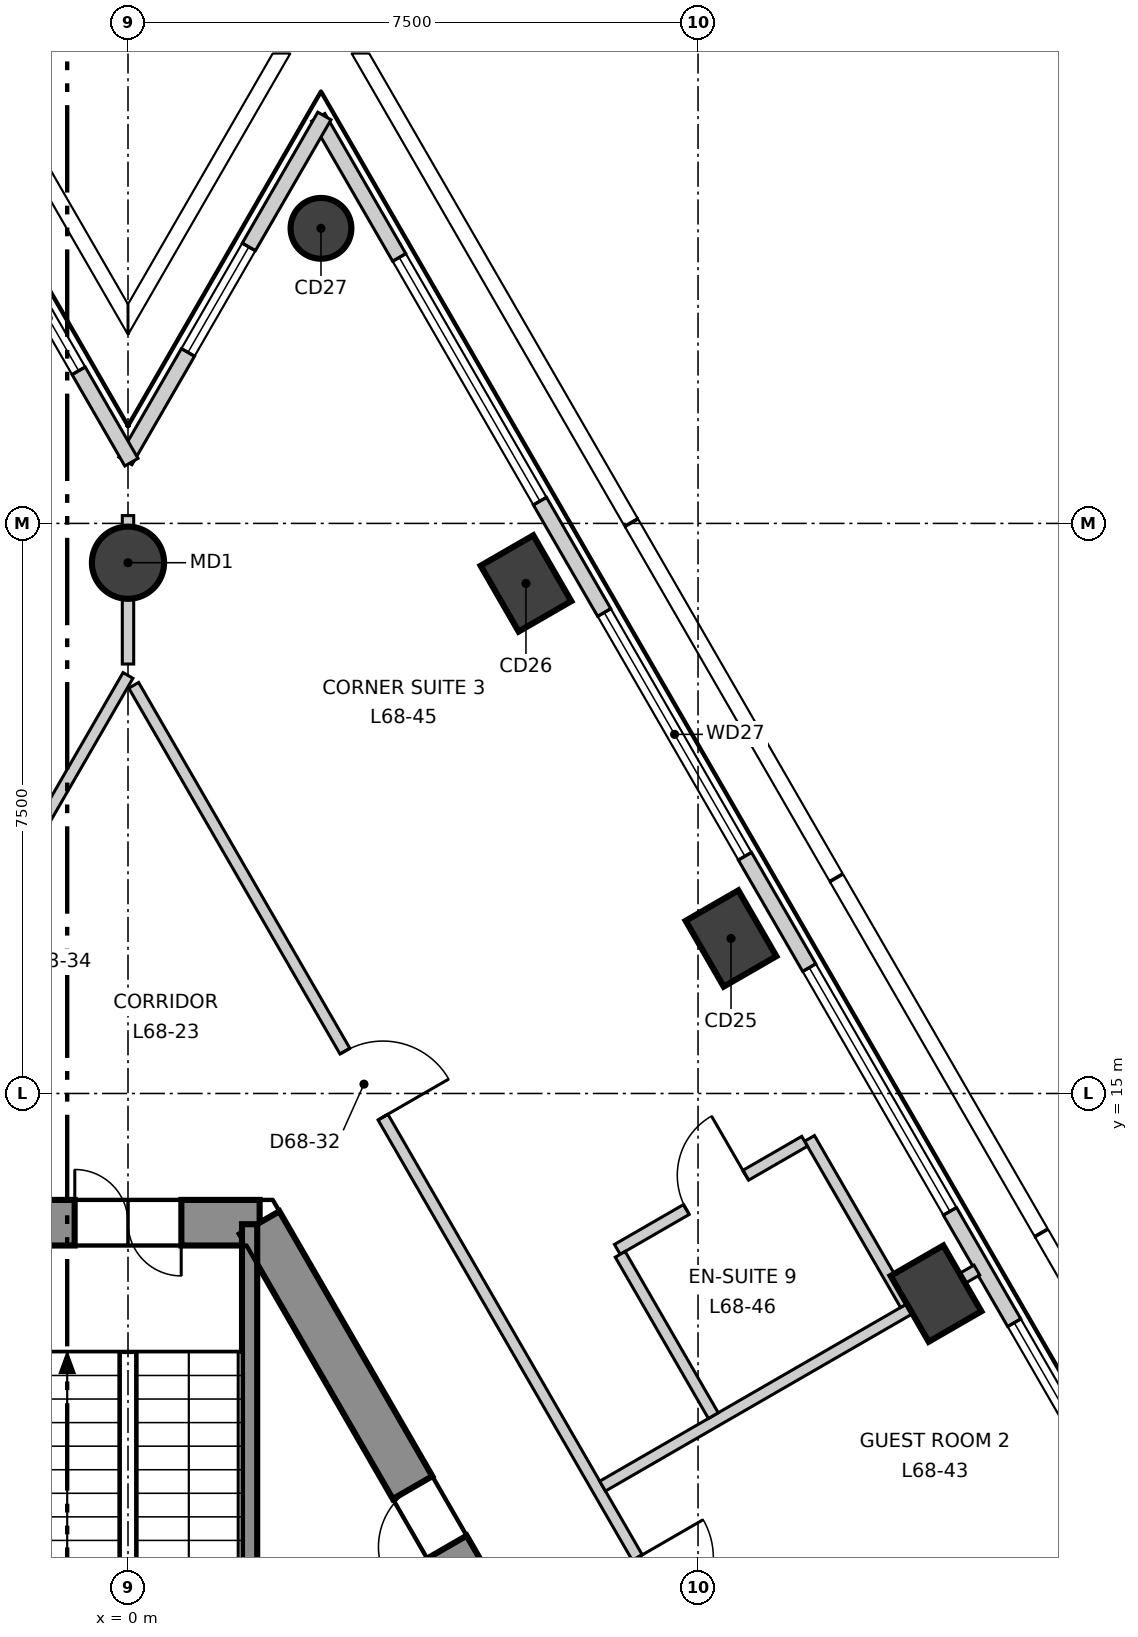
"""IFC4 building model, lengths in metres.
Left out: names, types, materials, properties, quantities, classifications, styles, units other than length and angle.
Written with IfcOpenShell. Run it as: python <this file> out.ifc"""

import sys

from ifc_helpers import new_model, si_unit, direction, frame, frame_2d, origin, origin_2d, place, context, subcontext, project, spatial, polyline, rectangle, circle, outline, extrude, element, fill, save


model = new_model("IFC4")
c1 = context("Model", 3, precision=1e-05, world=origin(), true_north=direction((0.0, 1.0)))
c2 = subcontext(c1, "Body", "Model", "MODEL_VIEW")
j1 = project(units=[si_unit("LENGTHUNIT", "METRE"), si_unit("PLANEANGLEUNIT", "RADIAN")], contexts=[c1])
p1 = place(None, origin())
s1 = spatial("IfcSite", under=j1, at=p1, CompositionType="ELEMENT")
p2 = place(p1, origin())
s2 = spatial("IfcBuilding", under=s1, at=p2, CompositionType="ELEMENT")
p3 = place(p2, frame((0.0, 0.0, 289.9)))
s3 = spatial("IfcBuildingStorey", under=s2, at=p3, CompositionType="ELEMENT", Elevation=289.9)
p4 = place(p3, frame((1.732, 13.3, -0.3), z_axis=(0.0, 0.0, 1.0), x_axis=(-1.0, 0.0, 0.0)))
e1 = element("IfcWall", 1, at=p4, inside=s3, PredefinedType="SHEAR", context=c2, shape_type="SweptSolid", body=[
    extrude(outline(polyline([(-0.173, -0.3), (1.732, -0.3), (3.637, -0.3), (3.291, 0.3), (1.732, 0.3), (0.173, 0.3), (-0.173, -0.3)])), origin(), (0.0, 0.0, 1.0), 3.6),
])
p5 = place(p4, frame((1.032, 0.0, 0.3)))
e2 = element("IfcOpeningElement", 2, at=p5, cuts=e1, PredefinedType="OPENING", context=c2, shape_type="SweptSolid", body=[
    extrude(rectangle(XDim=1.4, YDim=2.1, at=frame_2d((0.7, 1.05))), frame((0.0, 0.31, 0.0), z_axis=(0.0, -1.0, 0.0), x_axis=(1.0, 0.0, 0.0)), (0.0, 0.0, 1.0), 0.62),
])
p6 = place(p3, frame((12.384, -5.15, -0.3), z_axis=(0.0, 0.0, 1.0), x_axis=(-0.500000539815, 0.866025092122, 0.0)))
e3 = element("IfcWall", 3, at=p6, inside=s3, PredefinedType="SHEAR", context=c2, shape_type="SweptSolid", body=[
    extrude(outline(polyline([(-0.173, -0.301), (1.795, -0.301), (3.763, -0.301), (5.731, -0.301), (7.7, -0.301), (9.668, -0.301), (11.636, -0.301), (13.604, -0.3), (15.573, -0.3), (17.541, -0.3), (19.509, -0.3), (21.477, -0.3), (21.131, 0.3), (19.226, 0.3), (17.321, 0.3), (15.415, 0.3), (13.51, 0.3), (11.605, 0.3), (9.699, 0.3), (7.794, 0.3), (5.889, 0.3), (3.984, 0.3), (2.078, 0.3), (0.173, 0.3), (-0.173, -0.301)])), origin(), (0.0, 0.0, 1.0), 3.6),
])
p7 = place(p6, frame((16.378, 0.0, 0.3)))
e4 = element("IfcOpeningElement", 4, at=p7, cuts=e3, PredefinedType="OPENING", context=c2, shape_type="SweptSolid", body=[
    extrude(rectangle(XDim=0.9, YDim=2.1, at=frame_2d((0.45, 1.05))), frame((0.0, 0.31, 0.0), z_axis=(0.0, -1.0, 0.0), x_axis=(1.0, 0.0, 0.0)), (0.0, 0.0, 1.0), 0.621),
])
p8 = place(p6, frame((4.026, 0.0, 0.3)))
e5 = element("IfcOpeningElement", 5, at=p8, cuts=e3, PredefinedType="OPENING", context=c2, shape_type="SweptSolid", body=[
    extrude(rectangle(XDim=0.9, YDim=2.1, at=frame_2d((0.45, 1.05))), frame((0.0, 0.31, 0.0), z_axis=(0.0, -1.0, 0.0), x_axis=(1.0, 0.0, 0.0)), (0.0, 0.0, 1.0), 0.621),
])
for number, where, z_axis, x_axis in (
    (6, (10.631, 12.367, -0.3), (0.0, 0.0, 1.0), (-0.5, 0.866, 0.0)),
    (7, (7.934, 17.039, -0.3), (0.0, 0.0, 1.0), (-0.5, 0.866, 0.0)),
    (8, (5.236, 21.71, -0.3), (0.0, 0.0, 1.0), (-0.5, 0.866, 0.0)),
):
    element("IfcColumn", number, at=place(p3, frame(where, z_axis=z_axis, x_axis=x_axis)), inside=s3, PredefinedType="COLUMN", context=c2, shape_type="SweptSolid", body=[
        extrude(rectangle(XDim=1.0, YDim=0.8, at=origin_2d()), origin(), (0.0, 0.0, 1.0), 3.6),
    ])
p9 = place(p3, frame((2.539, 26.382, -0.3), z_axis=(0.0, 0.0, 1.0), x_axis=(-0.5, 0.866025403784, 0.0)))
e9 = element("IfcColumn", 9, at=p9, inside=s3, PredefinedType="COLUMN", context=c2, shape_type="SweptSolid", body=[
    extrude(circle(Radius=0.4, at=origin_2d()), origin(), (0.0, 0.0, 1.0), 3.6),
])
p10 = place(p3, frame((0.0, 21.983, -0.3), z_axis=(0.0, 0.0, 1.0), x_axis=(1.0, 0.0, 0.0)))
e10 = element("IfcColumn", 10, at=p10, inside=s3, PredefinedType="COLUMN", context=c2, shape_type="SweptSolid", body=[
    extrude(circle(Radius=0.475, at=origin_2d()), origin(), (0.0, 0.0, 1.0), 3.6),
])
p11 = place(p3, frame((25.375, -11.77, 0.0), z_axis=(0.0, 0.0, 1.0), x_axis=(-0.500008134474, 0.866020707292, 0.0)))
e11 = element("IfcWall", 11, at=p11, inside=s3, PredefinedType="ELEMENTEDWALL", context=c2, shape_type="SweptSolid", body=[
    extrude(rectangle(XDim=45.741, YDim=0.2, at=frame_2d((22.871, 0.0))), origin(), (0.0, 0.0, 1.0), 3.3),
])
p12 = place(p11, frame((2.15, 0.0, 0.9)))
e12 = element("IfcOpeningElement", 12, at=p12, cuts=e11, PredefinedType="OPENING", context=c2, shape_type="SweptSolid", body=[
    extrude(rectangle(XDim=3.7, YDim=2.2, at=frame_2d((1.85, 1.1))), frame((0.0, 0.11, 0.0), z_axis=(0.0, -1.0, 0.0), x_axis=(1.0, 0.0, 0.0)), (0.0, 0.0, 1.0), 0.22),
])
p13 = place(p11, frame((7.544, 0.0, 0.9)))
e13 = element("IfcOpeningElement", 13, at=p13, cuts=e11, PredefinedType="OPENING", context=c2, shape_type="SweptSolid", body=[
    extrude(rectangle(XDim=3.7, YDim=2.2, at=frame_2d((1.85, 1.1))), frame((0.0, 0.11, 0.0), z_axis=(0.0, -1.0, 0.0), x_axis=(1.0, 0.0, 0.0)), (0.0, 0.0, 1.0), 0.22),
])
p14 = place(p11, frame((12.939, 0.0, 0.9)))
e14 = element("IfcOpeningElement", 14, at=p14, cuts=e11, PredefinedType="OPENING", context=c2, shape_type="SweptSolid", body=[
    extrude(rectangle(XDim=3.7, YDim=2.2, at=frame_2d((1.85, 1.1))), frame((0.0, 0.11, 0.0), z_axis=(0.0, -1.0, 0.0), x_axis=(1.0, 0.0, 0.0)), (0.0, 0.0, 1.0), 0.22),
])
p15 = place(p11, frame((18.333, 0.0, 0.9)))
e15 = element("IfcOpeningElement", 15, at=p15, cuts=e11, PredefinedType="OPENING", context=c2, shape_type="SweptSolid", body=[
    extrude(rectangle(XDim=3.7, YDim=2.2, at=frame_2d((1.85, 1.1))), frame((0.0, 0.11, 0.0), z_axis=(0.0, -1.0, 0.0), x_axis=(1.0, 0.0, 0.0)), (0.0, 0.0, 1.0), 0.22),
])
p16 = place(p11, frame((23.728, 0.0, 0.9)))
e16 = element("IfcOpeningElement", 16, at=p16, cuts=e11, PredefinedType="OPENING", context=c2, shape_type="SweptSolid", body=[
    extrude(rectangle(XDim=3.7, YDim=2.2, at=frame_2d((1.85, 1.1))), frame((0.0, 0.11, 0.0), z_axis=(0.0, -1.0, 0.0), x_axis=(1.0, 0.0, 0.0)), (0.0, 0.0, 1.0), 0.22),
])
p17 = place(p11, frame((29.122, 0.0, 0.9)))
e17 = element("IfcOpeningElement", 17, at=p17, cuts=e11, PredefinedType="OPENING", context=c2, shape_type="SweptSolid", body=[
    extrude(rectangle(XDim=3.7, YDim=2.2, at=frame_2d((1.85, 1.1))), frame((0.0, 0.11, 0.0), z_axis=(0.0, -1.0, 0.0), x_axis=(1.0, 0.0, 0.0)), (0.0, 0.0, 1.0), 0.22),
])
p18 = place(p11, frame((34.517, 0.0, 0.9)))
e18 = element("IfcOpeningElement", 18, at=p18, cuts=e11, PredefinedType="OPENING", context=c2, shape_type="SweptSolid", body=[
    extrude(rectangle(XDim=3.7, YDim=2.2, at=frame_2d((1.85, 1.1))), frame((0.0, 0.11, 0.0), z_axis=(0.0, -1.0, 0.0), x_axis=(1.0, 0.0, 0.0)), (0.0, 0.0, 1.0), 0.22),
])
p19 = place(p11, frame((39.911, 0.0, 0.9)))
e19 = element("IfcOpeningElement", 19, at=p19, cuts=e11, PredefinedType="OPENING", context=c2, shape_type="SweptSolid", body=[
    extrude(rectangle(XDim=3.7, YDim=2.2, at=frame_2d((1.85, 1.1))), frame((0.0, 0.11, 0.0), z_axis=(0.0, -1.0, 0.0), x_axis=(1.0, 0.0, 0.0)), (0.0, 0.0, 1.0), 0.22),
])
p20 = place(p3, frame((2.584, 27.86, 0.0), z_axis=(0.0, 0.0, 1.0), x_axis=(-0.499832707108, -0.866121968839, 0.0)))
e20 = element("IfcWall", 20, at=p20, inside=s3, PredefinedType="ELEMENTEDWALL", context=c2, shape_type="SweptSolid", body=[
    extrude(rectangle(XDim=5.24, YDim=0.2, at=frame_2d((2.62, 0.0))), origin(), (0.0, 0.0, 1.0), 3.3),
])
p21 = place(p20, frame((1.99, 0.0, 0.9)))
e21 = element("IfcOpeningElement", 21, at=p21, cuts=e20, PredefinedType="OPENING", context=c2, shape_type="SweptSolid", body=[
    extrude(rectangle(XDim=1.6, YDim=2.2, at=frame_2d((0.8, 1.1))), frame((0.0, 0.11, 0.0), z_axis=(0.0, -1.0, 0.0), x_axis=(1.0, 0.0, 0.0)), (0.0, 0.0, 1.0), 0.22),
])
p22 = place(p3, frame((0.045, 23.305, 0.0), z_axis=(0.0, 0.0, 1.0), x_axis=(-0.499832707108, 0.866121968839, 0.0)))
e22 = element("IfcWall", 22, at=p22, inside=s3, PredefinedType="ELEMENTEDWALL", context=c2, shape_type="SweptSolid", body=[
    extrude(rectangle(XDim=5.24, YDim=0.2, at=frame_2d((2.62, 0.0))), origin(), (0.0, 0.0, 1.0), 3.3),
])
p23 = place(p22, frame((1.39, 0.0, 0.9)))
e23 = element("IfcOpeningElement", 23, at=p23, cuts=e22, PredefinedType="OPENING", context=c2, shape_type="SweptSolid", body=[
    extrude(rectangle(XDim=1.6, YDim=2.2, at=frame_2d((0.8, 1.1))), frame((0.0, 0.11, 0.0), z_axis=(0.0, -1.0, 0.0), x_axis=(1.0, 0.0, 0.0)), (0.0, 0.0, 1.0), 0.22),
])
p24 = place(p3, frame((-17.679, -10.12, 0.0), z_axis=(0.0, 0.0, 1.0), x_axis=(0.500008955215, 0.866020233427, 0.0)))
e24 = element("IfcWall", 24, at=p24, inside=s3, PredefinedType="PARTITIONING", context=c2, shape_type="SweptSolid", body=[
    extrude(rectangle(XDim=35.357, YDim=0.15, at=frame_2d((17.679, 0.0))), origin(), (0.0, 0.0, 1.0), 3.3),
])
p25 = place(p24, frame((31.407, 0.0, 0.0)))
e25 = element("IfcOpeningElement", 25, at=p25, cuts=e24, PredefinedType="OPENING", context=c2, shape_type="SweptSolid", body=[
    extrude(rectangle(XDim=1.0, YDim=2.1, at=frame_2d((0.5, 1.05))), frame((0.0, 0.085, 0.0), z_axis=(0.0, -1.0, 0.0), x_axis=(1.0, 0.0, 0.0)), (0.0, 0.0, 1.0), 0.17),
])
p26 = place(p24, frame((25.642, 0.0, 0.0)))
e26 = element("IfcOpeningElement", 26, at=p26, cuts=e24, PredefinedType="OPENING", context=c2, shape_type="SweptSolid", body=[
    extrude(rectangle(XDim=1.0, YDim=2.1, at=frame_2d((0.5, 1.05))), frame((0.0, 0.085, 0.0), z_axis=(0.0, -1.0, 0.0), x_axis=(1.0, 0.0, 0.0)), (0.0, 0.0, 1.0), 0.17),
])
p27 = place(p24, frame((18.348, 0.0, 0.0)))
e27 = element("IfcOpeningElement", 27, at=p27, cuts=e24, PredefinedType="OPENING", context=c2, shape_type="SweptSolid", body=[
    extrude(rectangle(XDim=1.0, YDim=2.1, at=frame_2d((0.5, 1.05))), frame((0.0, 0.085, 0.0), z_axis=(0.0, -1.0, 0.0), x_axis=(1.0, 0.0, 0.0)), (0.0, 0.0, 1.0), 0.17),
])
p28 = place(p24, frame((13.254, 0.0, 0.0)))
e28 = element("IfcOpeningElement", 28, at=p28, cuts=e24, PredefinedType="OPENING", context=c2, shape_type="SweptSolid", body=[
    extrude(rectangle(XDim=1.0, YDim=2.1, at=frame_2d((0.5, 1.05))), frame((0.0, 0.085, 0.0), z_axis=(0.0, -1.0, 0.0), x_axis=(1.0, 0.0, 0.0)), (0.0, 0.0, 1.0), 0.17),
])
p29 = place(p24, frame((7.559, 0.0, 0.0)))
e29 = element("IfcOpeningElement", 29, at=p29, cuts=e24, PredefinedType="OPENING", context=c2, shape_type="SweptSolid", body=[
    extrude(rectangle(XDim=1.0, YDim=2.1, at=frame_2d((0.5, 1.05))), frame((0.0, 0.085, 0.0), z_axis=(0.0, -1.0, 0.0), x_axis=(1.0, 0.0, 0.0)), (0.0, 0.0, 1.0), 0.17),
])
p30 = place(p24, frame((2.865, 0.0, 0.0)))
e30 = element("IfcOpeningElement", 30, at=p30, cuts=e24, PredefinedType="OPENING", context=c2, shape_type="SweptSolid", body=[
    extrude(rectangle(XDim=1.0, YDim=2.1, at=frame_2d((0.5, 1.05))), frame((0.0, 0.085, 0.0), z_axis=(0.0, -1.0, 0.0), x_axis=(1.0, 0.0, 0.0)), (0.0, 0.0, 1.0), 0.17),
])
p31 = place(p3, frame((0.0, 20.65, 0.0), z_axis=(0.0, 0.0, 1.0), x_axis=(0.0, 1.0, 0.0)))
e31 = element("IfcWall", 31, at=p31, inside=s3, PredefinedType="PARTITIONING", context=c2, shape_type="SweptSolid", body=[
    extrude(rectangle(XDim=1.953, YDim=0.15, at=frame_2d((0.977, 0.0))), origin(), (0.0, 0.0, 1.0), 2.8),
])
p32 = place(p3, frame((0.075, 20.37, 0.0), z_axis=(0.0, 0.0, 1.0), x_axis=(0.500009775255, -0.866019759965, 0.0)))
e32 = element("IfcWall", 32, at=p32, inside=s3, PredefinedType="PARTITIONING", context=c2, shape_type="SweptSolid", body=[
    extrude(rectangle(XDim=35.207, YDim=0.15, at=frame_2d((17.604, 0.0))), origin(), (0.0, 0.0, 1.0), 3.3),
])
p33 = place(p32, frame((31.407, 0.0, 0.0)))
e33 = element("IfcOpeningElement", 33, at=p33, cuts=e32, PredefinedType="OPENING", context=c2, shape_type="SweptSolid", body=[
    extrude(rectangle(XDim=1.0, YDim=2.1, at=frame_2d((0.5, 1.05))), frame((0.0, 0.085, 0.0), z_axis=(0.0, -1.0, 0.0), x_axis=(1.0, 0.0, 0.0)), (0.0, 0.0, 1.0), 0.17),
])
p34 = place(p32, frame((19.243, 0.0, 0.0)))
e34 = element("IfcOpeningElement", 34, at=p34, cuts=e32, PredefinedType="OPENING", context=c2, shape_type="SweptSolid", body=[
    extrude(rectangle(XDim=1.0, YDim=2.1, at=frame_2d((0.5, 1.05))), frame((0.0, 0.085, 0.0), z_axis=(0.0, -1.0, 0.0), x_axis=(1.0, 0.0, 0.0)), (0.0, 0.0, 1.0), 0.17),
])
p35 = place(p32, frame((24.543, 0.0, 0.0)))
e35 = element("IfcOpeningElement", 35, at=p35, cuts=e32, PredefinedType="OPENING", context=c2, shape_type="SweptSolid", body=[
    extrude(rectangle(XDim=0.9, YDim=2.1, at=frame_2d((0.45, 1.05))), frame((0.0, 0.085, 0.0), z_axis=(0.0, -1.0, 0.0), x_axis=(1.0, 0.0, 0.0)), (0.0, 0.0, 1.0), 0.17),
])
p36 = place(p32, frame((22.443, 0.0, 0.0)))
e36 = element("IfcOpeningElement", 36, at=p36, cuts=e32, PredefinedType="OPENING", context=c2, shape_type="SweptSolid", body=[
    extrude(rectangle(XDim=0.9, YDim=2.1, at=frame_2d((0.45, 1.05))), frame((0.0, 0.085, 0.0), z_axis=(0.0, -1.0, 0.0), x_axis=(1.0, 0.0, 0.0)), (0.0, 0.0, 1.0), 0.17),
])
p37 = place(p32, frame((13.253, 0.0, 0.0)))
e37 = element("IfcOpeningElement", 37, at=p37, cuts=e32, PredefinedType="OPENING", context=c2, shape_type="SweptSolid", body=[
    extrude(rectangle(XDim=1.0, YDim=2.1, at=frame_2d((0.5, 1.05))), frame((0.0, 0.085, 0.0), z_axis=(0.0, -1.0, 0.0), x_axis=(1.0, 0.0, 0.0)), (0.0, 0.0, 1.0), 0.17),
])
p38 = place(p32, frame((5.559, 0.0, 0.0)))
e38 = element("IfcOpeningElement", 38, at=p38, cuts=e32, PredefinedType="OPENING", context=c2, shape_type="SweptSolid", body=[
    extrude(rectangle(XDim=1.0, YDim=2.1, at=frame_2d((0.5, 1.05))), frame((0.0, 0.085, 0.0), z_axis=(0.0, -1.0, 0.0), x_axis=(1.0, 0.0, 0.0)), (0.0, 0.0, 1.0), 0.17),
])
p39 = place(p3, frame((6.244, 9.834, 0.0), z_axis=(0.0, 0.0, 1.0), x_axis=(0.866017549727, 0.50001360338, 0.0)))
e39 = element("IfcWall", 39, at=p39, inside=s3, PredefinedType="PARTITIONING", context=c2, shape_type="SweptSolid", body=[
    extrude(rectangle(XDim=5.686, YDim=0.15, at=frame_2d((2.843, 0.0))), origin(), (0.0, 0.0, 1.0), 3.3),
])
p40 = place(p3, frame((8.967, 14.409, 0.0), z_axis=(0.0, 0.0, 1.0), x_axis=(0.500079482444, -0.865979509711, 0.0)))
e40 = element("IfcWall", 40, at=p40, inside=s3, PredefinedType="PARTITIONING", context=c2, shape_type="SweptSolid", body=[
    extrude(rectangle(XDim=2.525, YDim=0.15, at=frame_2d((1.263, 0.0))), origin(), (0.0, 0.0, 1.0), 2.6),
])
p41 = place(p3, frame((6.438, 12.949, 0.0), z_axis=(0.0, 0.0, 1.0), x_axis=(0.866107001057, 0.499858642738, 0.0)))
e41 = element("IfcWall", 41, at=p41, inside=s3, PredefinedType="PARTITIONING", context=c2, shape_type="SweptSolid", body=[
    extrude(rectangle(XDim=2.845, YDim=0.15, at=frame_2d((1.422, 0.0))), origin(), (0.0, 0.0, 1.0), 3.3),
])
p42 = place(p41, frame((1.05, 0.0, 0.0)))
e42 = element("IfcOpeningElement", 42, at=p42, cuts=e41, PredefinedType="OPENING", context=c2, shape_type="SweptSolid", body=[
    extrude(rectangle(XDim=0.9, YDim=2.1, at=frame_2d((0.45, 1.05))), frame((0.0, 0.085, 0.0), z_axis=(0.0, -1.0, 0.0), x_axis=(1.0, 0.0, 0.0)), (0.0, 0.0, 1.0), 0.17),
])
p43 = place(p3, frame((6.476, 12.884, 0.0), z_axis=(0.0, 0.0, 1.0), x_axis=(0.499900713578, -0.866082719239, 0.0)))
e43 = element("IfcWall", 43, at=p43, inside=s3, PredefinedType="PARTITIONING", context=c2, shape_type="SweptSolid", body=[
    extrude(rectangle(XDim=2.45, YDim=0.15, at=frame_2d((1.225, 0.0))), origin(), (0.0, 0.0, 1.0), 3.3),
])
p44 = place(p3, frame((1.6, 6.615, 0.0), z_axis=(0.0, 0.0, 1.0), x_axis=(0.0, 1.0, 0.0)))
e44 = element("IfcWall", 44, at=p44, inside=s3, PredefinedType="SOLIDWALL", context=c2, shape_type="SweptSolid", body=[
    extrude(rectangle(XDim=6.665, YDim=0.2, at=frame_2d((3.333, 0.0))), origin(), (0.0, 0.0, 1.0), 3.3),
])
p45 = place(p16, origin())
e45 = element("IfcWindow", 45, at=p45, inside=s3, PartitioningType="SINGLE_PANEL", PredefinedType="WINDOW", context=c2, shape_type="SweptSolid", body=[
    extrude(rectangle(XDim=3.7, YDim=2.2, at=frame_2d((1.85, 1.1))), frame((0.0, 0.03, 0.0), z_axis=(0.0, -1.0, 0.0), x_axis=(1.0, 0.0, 0.0)), (0.0, 0.0, 1.0), 0.06),
])
fill(e16, e45)
p46 = place(p17, origin())
e46 = element("IfcWindow", 46, at=p46, inside=s3, PartitioningType="SINGLE_PANEL", PredefinedType="WINDOW", context=c2, shape_type="SweptSolid", body=[
    extrude(rectangle(XDim=3.7, YDim=2.2, at=frame_2d((1.85, 1.1))), frame((0.0, 0.03, 0.0), z_axis=(0.0, -1.0, 0.0), x_axis=(1.0, 0.0, 0.0)), (0.0, 0.0, 1.0), 0.06),
])
fill(e17, e46)
p47 = place(p18, origin())
e47 = element("IfcWindow", 47, at=p47, inside=s3, PartitioningType="SINGLE_PANEL", PredefinedType="WINDOW", context=c2, shape_type="SweptSolid", body=[
    extrude(rectangle(XDim=3.7, YDim=2.2, at=frame_2d((1.85, 1.1))), frame((0.0, 0.03, 0.0), z_axis=(0.0, -1.0, 0.0), x_axis=(1.0, 0.0, 0.0)), (0.0, 0.0, 1.0), 0.06),
])
fill(e18, e47)
p48 = place(p19, origin())
e48 = element("IfcWindow", 48, at=p48, inside=s3, PartitioningType="SINGLE_PANEL", PredefinedType="WINDOW", context=c2, shape_type="SweptSolid", body=[
    extrude(rectangle(XDim=3.7, YDim=2.2, at=frame_2d((1.85, 1.1))), frame((0.0, 0.03, 0.0), z_axis=(0.0, -1.0, 0.0), x_axis=(1.0, 0.0, 0.0)), (0.0, 0.0, 1.0), 0.06),
])
fill(e19, e48)
p49 = place(p21, origin())
e49 = element("IfcWindow", 49, at=p49, inside=s3, PartitioningType="SINGLE_PANEL", PredefinedType="WINDOW", context=c2, shape_type="SweptSolid", body=[
    extrude(rectangle(XDim=1.6, YDim=2.2, at=frame_2d((0.8, 1.1))), frame((0.0, 0.03, 0.0), z_axis=(0.0, -1.0, 0.0), x_axis=(1.0, 0.0, 0.0)), (0.0, 0.0, 1.0), 0.06),
])
fill(e21, e49)
p50 = place(p23, origin())
e50 = element("IfcWindow", 50, at=p50, inside=s3, PartitioningType="SINGLE_PANEL", PredefinedType="WINDOW", context=c2, shape_type="SweptSolid", body=[
    extrude(rectangle(XDim=1.6, YDim=2.2, at=frame_2d((0.8, 1.1))), frame((0.0, 0.03, 0.0), z_axis=(0.0, -1.0, 0.0), x_axis=(1.0, 0.0, 0.0)), (0.0, 0.0, 1.0), 0.06),
])
fill(e23, e50)
p51 = place(p37, origin())
e51 = element("IfcDoor", 51, at=p51, inside=s3, OperationType="SINGLE_SWING_RIGHT", PredefinedType="DOOR", context=c2, shape_type="SweptSolid", body=[
    extrude(rectangle(XDim=1.0, YDim=2.1, at=frame_2d((0.5, 1.05))), frame((0.0, 0.025, 0.0), z_axis=(0.0, -1.0, 0.0), x_axis=(1.0, 0.0, 0.0)), (0.0, 0.0, 1.0), 0.05),
])
fill(e37, e51)
p52 = place(p38, origin())
e52 = element("IfcDoor", 52, at=p52, inside=s3, OperationType="SINGLE_SWING_LEFT", PredefinedType="DOOR", context=c2, shape_type="SweptSolid", body=[
    extrude(rectangle(XDim=1.0, YDim=2.1, at=frame_2d((0.5, 1.05))), frame((0.0, 0.025, 0.0), z_axis=(0.0, -1.0, 0.0), x_axis=(1.0, 0.0, 0.0)), (0.0, 0.0, 1.0), 0.05),
])
fill(e38, e52)
p53 = place(p42, origin())
e53 = element("IfcDoor", 53, at=p53, inside=s3, OperationType="SINGLE_SWING_LEFT", PredefinedType="DOOR", context=c2, shape_type="SweptSolid", body=[
    extrude(rectangle(XDim=0.9, YDim=2.1, at=frame_2d((0.45, 1.05))), frame((0.0, 0.025, 0.0), z_axis=(0.0, -1.0, 0.0), x_axis=(1.0, 0.0, 0.0)), (0.0, 0.0, 1.0), 0.05),
])
fill(e42, e53)
p54 = place(p5, origin())
e54 = element("IfcDoor", 54, at=p54, inside=s3, OperationType="DOUBLE_DOOR_SINGLE_SWING", PredefinedType="DOOR", context=c2, shape_type="SweptSolid", body=[
    extrude(rectangle(XDim=1.4, YDim=2.1, at=frame_2d((0.7, 1.05))), frame((0.0, 0.025, 0.0), z_axis=(0.0, -1.0, 0.0), x_axis=(1.0, 0.0, 0.0)), (0.0, 0.0, 1.0), 0.05),
])
fill(e2, e54)
p55 = place(p7, origin())
e55 = element("IfcDoor", 55, at=p55, inside=s3, OperationType="SINGLE_SWING_RIGHT", PredefinedType="DOOR", context=c2, shape_type="SweptSolid", body=[
    extrude(rectangle(XDim=0.9, YDim=2.1, at=frame_2d((0.45, 1.05))), frame((0.0, 0.025, 0.0), z_axis=(0.0, -1.0, 0.0), x_axis=(1.0, 0.0, 0.0)), (0.0, 0.0, 1.0), 0.05),
])
fill(e4, e55)
save(model, sys.argv[1])
